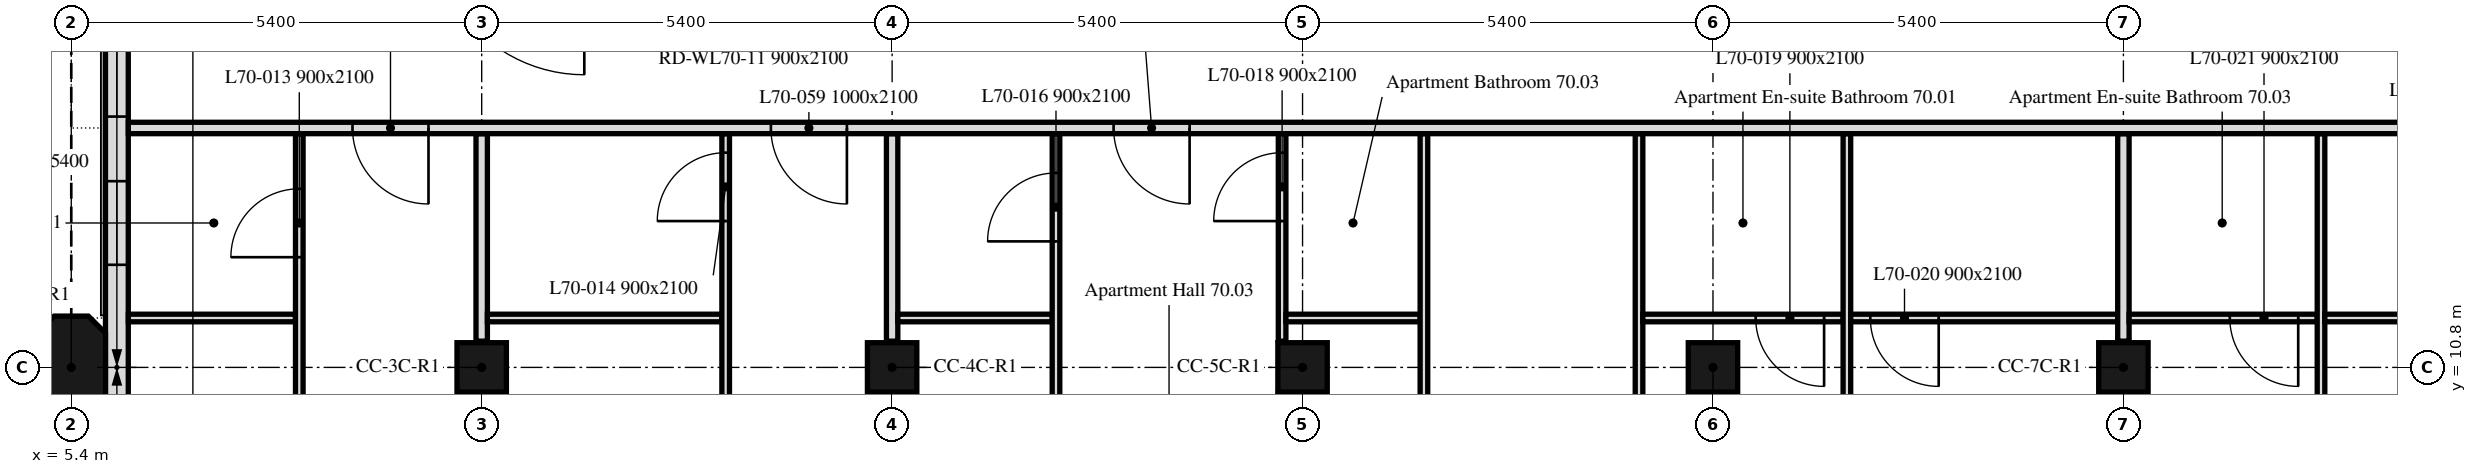
"""IFC4 building model, lengths in metres.
Left out: names, types, materials, properties, quantities, classifications, styles, units other than length and angle.
Written with IfcOpenShell. Run it as: python <this file> out.ifc"""

import sys

from ifc_helpers import new_model, si_unit, direction, frame, frame_2d, origin, origin_2d, place, context, subcontext, project, spatial, polyline, rectangle, outline, extrude, element, fill, save


model = new_model("IFC4")
c1 = context("Model", 3, precision=1e-05, world=origin(), true_north=direction((0.0, 1.0)))
c2 = subcontext(c1, "Body", "Model", "MODEL_VIEW")
j1 = project(units=[si_unit("LENGTHUNIT", "METRE"), si_unit("PLANEANGLEUNIT", "RADIAN")], contexts=[c1])
p1 = place(None, origin())
s1 = spatial("IfcSite", under=j1, at=p1, CompositionType="ELEMENT")
p2 = place(p1, origin())
s2 = spatial("IfcBuilding", under=s1, at=p2, CompositionType="ELEMENT")
p3 = place(p2, frame((0.0, 0.0, 285.1)))
s3 = spatial("IfcBuildingStorey", under=s2, at=p3, CompositionType="ELEMENT", Elevation=285.1)
p4 = place(p3, frame((5.4, 10.8, 0.0), z_axis=(0.0, 0.0, 1.0), x_axis=(0.0, 1.0, 0.0)))
e1 = element("IfcColumn", 1, at=p4, inside=s3, PredefinedType="COLUMN", context=c2, shape_type="SweptSolid", body=[
    extrude(outline(polyline([(-0.45, -0.45), (0.45, -0.45), (0.675, -0.225), (0.675, 0.225), (0.45, 0.45), (-0.45, 0.45), (-0.675, 0.225), (-0.675, -0.225), (-0.45, -0.45)])), origin(), (0.0, 0.0, 1.0), 3.0),
])
for number, where, z_axis, x_axis in (
    (2, (10.8, 10.8, 0.0), (0.0, 0.0, 1.0), (1.0, 0.0, 0.0)),
    (3, (16.2, 10.8, 0.0), (0.0, 0.0, 1.0), (1.0, 0.0, 0.0)),
    (4, (21.6, 10.8, 0.0), (0.0, 0.0, 1.0), (1.0, 0.0, 0.0)),
    (5, (27.0, 10.8, 0.0), (0.0, 0.0, 1.0), (1.0, 0.0, 0.0)),
    (6, (32.4, 10.8, 0.0), (0.0, 0.0, 1.0), (1.0, 0.0, 0.0)),
):
    element("IfcColumn", number, at=place(p3, frame(where, z_axis=z_axis, x_axis=x_axis)), inside=s3, PredefinedType="COLUMN", context=c2, shape_type="SweptSolid", body=[
        extrude(rectangle(XDim=0.65, YDim=0.65, at=origin_2d()), origin(), (0.0, 0.0, 1.0), 3.0),
    ])
p5 = place(p3, frame((6.0, 16.2, 0.0), z_axis=(0.0, 0.0, 1.0), x_axis=(0.0, -1.0, 0.0)))
e7 = element("IfcWall", 7, at=p5, inside=s3, PredefinedType="SOLIDWALL", context=c2, shape_type="SweptSolid", body=[
    extrude(rectangle(XDim=10.614, YDim=0.3, at=frame_2d((5.307, 0.0))), origin(), (0.0, 0.0, 1.0), 3.0),
])
p6 = place(p5, frame((1.0, 0.0, 0.9)))
e8 = element("IfcOpeningElement", 8, at=p6, cuts=e7, PredefinedType="OPENING", context=c2, shape_type="SweptSolid", body=[
    extrude(rectangle(XDim=1.1, YDim=1.7, at=frame_2d((0.55, 0.85))), frame((0.0, 0.16, 0.0), z_axis=(0.0, -1.0, 0.0), x_axis=(1.0, 0.0, 0.0)), (0.0, 0.0, 1.0), 0.32),
])
p7 = place(p5, frame((2.95, 0.0, 0.9)))
e9 = element("IfcOpeningElement", 9, at=p7, cuts=e7, PredefinedType="OPENING", context=c2, shape_type="SweptSolid", body=[
    extrude(rectangle(XDim=1.1, YDim=1.7, at=frame_2d((0.55, 0.85))), frame((0.0, 0.16, 0.0), z_axis=(0.0, -1.0, 0.0), x_axis=(1.0, 0.0, 0.0)), (0.0, 0.0, 1.0), 0.32),
])
p8 = place(p5, frame((6.75, 0.0, 0.9)))
e10 = element("IfcOpeningElement", 10, at=p8, cuts=e7, PredefinedType="OPENING", context=c2, shape_type="SweptSolid", body=[
    extrude(rectangle(XDim=1.1, YDim=1.7, at=frame_2d((0.55, 0.85))), frame((0.0, 0.16, 0.0), z_axis=(0.0, -1.0, 0.0), x_axis=(1.0, 0.0, 0.0)), (0.0, 0.0, 1.0), 0.32),
])
p9 = place(p5, frame((8.35, 0.0, 0.9)))
e11 = element("IfcOpeningElement", 11, at=p9, cuts=e7, PredefinedType="OPENING", context=c2, shape_type="SweptSolid", body=[
    extrude(rectangle(XDim=1.1, YDim=1.7, at=frame_2d((0.55, 0.85))), frame((0.0, 0.16, 0.0), z_axis=(0.0, -1.0, 0.0), x_axis=(1.0, 0.0, 0.0)), (0.0, 0.0, 1.0), 0.32),
])
p10 = place(p3, frame((8.35, 11.45, 0.0), z_axis=(0.0, 0.0, 1.0), x_axis=(-1.0, 0.0, 0.0)))
e12 = element("IfcWall", 12, at=p10, inside=s3, PredefinedType="PARTITIONING", context=c2, shape_type="SweptSolid", body=[
    extrude(rectangle(XDim=2.199, YDim=0.1, at=frame_2d((1.1, 0.0))), origin(), (0.0, 0.0, 1.0), 3.0),
])
p11 = place(p3, frame((8.4, 5.9, 0.0), z_axis=(0.0, 0.0, 1.0), x_axis=(0.0, 1.0, 0.0)))
e13 = element("IfcWall", 13, at=p11, inside=s3, PredefinedType="PARTITIONING", context=c2, shape_type="SweptSolid", body=[
    extrude(rectangle(XDim=7.975, YDim=0.1, at=frame_2d((3.988, 0.0))), origin(), (0.0, 0.0, 1.0), 3.0),
])
p12 = place(p11, frame((6.35, 0.0, 0.0)))
e14 = element("IfcOpeningElement", 14, at=p12, cuts=e13, PredefinedType="OPENING", context=c2, shape_type="SweptSolid", body=[
    extrude(rectangle(XDim=0.9, YDim=2.1, at=frame_2d((0.45, 1.05))), frame((0.0, 0.05, 0.0), z_axis=(0.0, -1.0, 0.0), x_axis=(1.0, 0.0, 0.0)), (0.0, 0.0, 1.0), 0.1),
])
p13 = place(p11, frame((2.3, 0.0, 0.0)))
e15 = element("IfcOpeningElement", 15, at=p13, cuts=e13, PredefinedType="OPENING", context=c2, shape_type="SweptSolid", body=[
    extrude(rectangle(XDim=0.9, YDim=2.1, at=frame_2d((0.45, 1.05))), frame((0.0, 0.05, 0.0), z_axis=(0.0, -1.0, 0.0), x_axis=(1.0, 0.0, 0.0)), (0.0, 0.0, 1.0), 0.1),
])
p14 = place(p3, frame((10.8, 5.9, 0.0), z_axis=(0.0, 0.0, 1.0), x_axis=(0.0, 1.0, 0.0)))
e16 = element("IfcWall", 16, at=p14, inside=s3, PredefinedType="PARTITIONING", context=c2, shape_type="SweptSolid", body=[
    extrude(rectangle(XDim=4.555, YDim=0.15, at=frame_2d((2.278, 0.0))), origin(), (0.0, 0.0, 1.0), 3.0),
])
p15 = place(p3, frame((10.8, 11.145, 0.0), z_axis=(0.0, 0.0, 1.0), x_axis=(0.0, 1.0, 0.0)))
e17 = element("IfcWall", 17, at=p15, inside=s3, PredefinedType="PARTITIONING", context=c2, shape_type="SweptSolid", body=[
    extrude(rectangle(XDim=2.73, YDim=0.15, at=frame_2d((1.365, 0.0))), origin(), (0.0, 0.0, 1.0), 3.0),
])
p16 = place(p3, frame((13.96, 11.45, 0.0), z_axis=(0.0, 0.0, 1.0), x_axis=(-1.0, 0.0, 0.0)))
e18 = element("IfcWall", 18, at=p16, inside=s3, PredefinedType="PARTITIONING", context=c2, shape_type="SweptSolid", body=[
    extrude(rectangle(XDim=3.085, YDim=0.1, at=frame_2d((1.542, 0.0))), origin(), (0.0, 0.0, 1.0), 3.0),
])
p17 = place(p3, frame((14.01, 5.9, 0.0), z_axis=(0.0, 0.0, 1.0), x_axis=(0.0, 1.0, 0.0)))
e19 = element("IfcWall", 19, at=p17, inside=s3, PredefinedType="PARTITIONING", context=c2, shape_type="SweptSolid", body=[
    extrude(rectangle(XDim=7.975, YDim=0.1, at=frame_2d((3.988, 0.0))), origin(), (0.0, 0.0, 1.0), 3.0),
])
p18 = place(p17, frame((6.825, 0.0, 0.0)))
e20 = element("IfcOpeningElement", 20, at=p18, cuts=e19, PredefinedType="OPENING", context=c2, shape_type="SweptSolid", body=[
    extrude(rectangle(XDim=0.9, YDim=2.1, at=frame_2d((0.45, 1.05))), frame((0.0, 0.05, 0.0), z_axis=(0.0, -1.0, 0.0), x_axis=(1.0, 0.0, 0.0)), (0.0, 0.0, 1.0), 0.1),
])
p19 = place(p17, frame((2.3, 0.0, 0.0)))
e21 = element("IfcOpeningElement", 21, at=p19, cuts=e19, PredefinedType="OPENING", context=c2, shape_type="SweptSolid", body=[
    extrude(rectangle(XDim=0.9, YDim=2.1, at=frame_2d((0.45, 1.05))), frame((0.0, 0.05, 0.0), z_axis=(0.0, -1.0, 0.0), x_axis=(1.0, 0.0, 0.0)), (0.0, 0.0, 1.0), 0.1),
])
p20 = place(p3, frame((16.2, 5.9, 0.0), z_axis=(0.0, 0.0, 1.0), x_axis=(0.0, 1.0, 0.0)))
e22 = element("IfcWall", 22, at=p20, inside=s3, PredefinedType="PARTITIONING", context=c2, shape_type="SweptSolid", body=[
    extrude(rectangle(XDim=4.555, YDim=0.15, at=frame_2d((2.278, 0.0))), origin(), (0.0, 0.0, 1.0), 2.4),
])
p21 = place(p3, frame((16.2, 11.145, 0.0), z_axis=(0.0, 0.0, 1.0), x_axis=(0.0, 1.0, 0.0)))
e23 = element("IfcWall", 23, at=p21, inside=s3, PredefinedType="PARTITIONING", context=c2, shape_type="SweptSolid", body=[
    extrude(rectangle(XDim=2.73, YDim=0.15, at=frame_2d((1.365, 0.0))), origin(), (0.0, 0.0, 1.0), 2.4),
])
p22 = place(p3, frame((18.306, 11.45, 0.0), z_axis=(0.0, 0.0, 1.0), x_axis=(-1.0, 0.0, 0.0)))
e24 = element("IfcWall", 24, at=p22, inside=s3, PredefinedType="PARTITIONING", context=c2, shape_type="SweptSolid", body=[
    extrude(rectangle(XDim=2.031, YDim=0.1, at=frame_2d((1.016, 0.0))), origin(), (0.0, 0.0, 1.0), 3.0),
])
p23 = place(p3, frame((18.356, 5.9, 0.0), z_axis=(0.0, 0.0, 1.0), x_axis=(0.0, 1.0, 0.0)))
e25 = element("IfcWall", 25, at=p23, inside=s3, PredefinedType="PARTITIONING", context=c2, shape_type="SweptSolid", body=[
    extrude(rectangle(XDim=7.975, YDim=0.1, at=frame_2d((3.988, 0.0))), origin(), (0.0, 0.0, 1.0), 3.0),
])
p24 = place(p23, frame((6.558, 0.0, 0.0)))
e26 = element("IfcOpeningElement", 26, at=p24, cuts=e25, PredefinedType="OPENING", context=c2, shape_type="SweptSolid", body=[
    extrude(rectangle(XDim=0.9, YDim=2.1, at=frame_2d((0.45, 1.05))), frame((0.0, 0.05, 0.0), z_axis=(0.0, -1.0, 0.0), x_axis=(1.0, 0.0, 0.0)), (0.0, 0.0, 1.0), 0.1),
])
p25 = place(p23, frame((2.3, 0.0, 0.0)))
e27 = element("IfcOpeningElement", 27, at=p25, cuts=e25, PredefinedType="OPENING", context=c2, shape_type="SweptSolid", body=[
    extrude(rectangle(XDim=0.9, YDim=2.1, at=frame_2d((0.45, 1.05))), frame((0.0, 0.05, 0.0), z_axis=(0.0, -1.0, 0.0), x_axis=(1.0, 0.0, 0.0)), (0.0, 0.0, 1.0), 0.1),
])
p26 = place(p3, frame((21.331, 5.9, 0.0), z_axis=(0.0, 0.0, 1.0), x_axis=(0.0, 1.0, 0.0)))
e28 = element("IfcWall", 28, at=p26, inside=s3, PredefinedType="PARTITIONING", context=c2, shape_type="SweptSolid", body=[
    extrude(rectangle(XDim=4.555, YDim=0.1, at=frame_2d((2.278, 0.0))), origin(), (0.0, 0.0, 1.0), 3.0),
])
p27 = place(p26, frame((1.787, 0.0, 0.0)))
e29 = element("IfcOpeningElement", 29, at=p27, cuts=e28, PredefinedType="OPENING", context=c2, shape_type="SweptSolid", body=[
    extrude(rectangle(XDim=0.9, YDim=2.1, at=frame_2d((0.45, 1.05))), frame((0.0, 0.05, 0.0), z_axis=(0.0, -1.0, 0.0), x_axis=(1.0, 0.0, 0.0)), (0.0, 0.0, 1.0), 0.1),
])
p28 = place(p3, frame((21.331, 11.145, 0.0), z_axis=(0.0, 0.0, 1.0), x_axis=(0.0, 1.0, 0.0)))
e30 = element("IfcWall", 30, at=p28, inside=s3, PredefinedType="PARTITIONING", context=c2, shape_type="SweptSolid", body=[
    extrude(rectangle(XDim=2.73, YDim=0.1, at=frame_2d((1.365, 0.0))), origin(), (0.0, 0.0, 1.0), 3.0),
])
p29 = place(p28, frame((1.58, 0.0, 0.0)))
e31 = element("IfcOpeningElement", 31, at=p29, cuts=e30, PredefinedType="OPENING", context=c2, shape_type="SweptSolid", body=[
    extrude(rectangle(XDim=0.9, YDim=2.1, at=frame_2d((0.45, 1.05))), frame((0.0, 0.05, 0.0), z_axis=(0.0, -1.0, 0.0), x_axis=(1.0, 0.0, 0.0)), (0.0, 0.0, 1.0), 0.1),
])
p30 = place(p3, frame((23.147, 11.45, 0.0), z_axis=(0.0, 0.0, 1.0), x_axis=(-1.0, 0.0, 0.0)))
e32 = element("IfcWall", 32, at=p30, inside=s3, PredefinedType="PARTITIONING", context=c2, shape_type="SweptSolid", body=[
    extrude(rectangle(XDim=1.766, YDim=0.1, at=frame_2d((0.883, 0.0))), origin(), (0.0, 0.0, 1.0), 2.4),
])
for number, where, z_axis, x_axis in (
    (33, (23.197, 5.9, 0.0), (0.0, 0.0, 1.0), (0.0, 1.0, 0.0)),
    (34, (26.027, 5.9, 0.0), (0.0, 0.0, 1.0), (0.0, 1.0, 0.0)),
):
    element("IfcWall", number, at=place(p3, frame(where, z_axis=z_axis, x_axis=x_axis)), inside=s3, PredefinedType="PARTITIONING", context=c2, shape_type="SweptSolid", body=[
        extrude(rectangle(XDim=7.975, YDim=0.1, at=frame_2d((3.988, 0.0))), origin(), (0.0, 0.0, 1.0), 3.0),
    ])
p31 = place(p3, frame((28.712, 11.45, 0.0), z_axis=(0.0, 0.0, 1.0), x_axis=(-1.0, 0.0, 0.0)))
e35 = element("IfcWall", 35, at=p31, inside=s3, PredefinedType="PARTITIONING", context=c2, shape_type="SweptSolid", body=[
    extrude(rectangle(XDim=2.635, YDim=0.1, at=frame_2d((1.317, 0.0))), origin(), (0.0, 0.0, 1.0), 2.4),
])
p32 = place(p31, frame((0.25, 0.0, 0.0)))
e36 = element("IfcOpeningElement", 36, at=p32, cuts=e35, PredefinedType="OPENING", context=c2, shape_type="SweptSolid", body=[
    extrude(rectangle(XDim=0.9, YDim=2.1, at=frame_2d((0.45, 1.05))), frame((0.0, 0.05, 0.0), z_axis=(0.0, -1.0, 0.0), x_axis=(1.0, 0.0, 0.0)), (0.0, 0.0, 1.0), 0.1),
])
p33 = place(p3, frame((28.762, 5.9, 0.0), z_axis=(0.0, 0.0, 1.0), x_axis=(0.0, 1.0, 0.0)))
e37 = element("IfcWall", 37, at=p33, inside=s3, PredefinedType="PARTITIONING", context=c2, shape_type="SweptSolid", body=[
    extrude(rectangle(XDim=7.975, YDim=0.1, at=frame_2d((3.988, 0.0))), origin(), (0.0, 0.0, 1.0), 3.0),
])
p34 = place(p3, frame((32.4, 5.9, 0.0), z_axis=(0.0, 0.0, 1.0), x_axis=(0.0, 1.0, 0.0)))
e38 = element("IfcWall", 38, at=p34, inside=s3, PredefinedType="PARTITIONING", context=c2, shape_type="SweptSolid", body=[
    extrude(rectangle(XDim=4.555, YDim=0.15, at=frame_2d((2.278, 0.0))), origin(), (0.0, 0.0, 1.0), 2.4),
])
p35 = place(p3, frame((32.325, 11.45, 0.0), z_axis=(0.0, 0.0, 1.0), x_axis=(-1.0, 0.0, 0.0)))
e39 = element("IfcWall", 39, at=p35, inside=s3, PredefinedType="PARTITIONING", context=c2, shape_type="SweptSolid", body=[
    extrude(rectangle(XDim=3.513, YDim=0.1, at=frame_2d((1.756, 0.0))), origin(), (0.0, 0.0, 1.0), 3.0),
])
p36 = place(p35, frame((2.355, 0.0, 0.0)))
e40 = element("IfcOpeningElement", 40, at=p36, cuts=e39, PredefinedType="OPENING", context=c2, shape_type="SweptSolid", body=[
    extrude(rectangle(XDim=0.9, YDim=2.1, at=frame_2d((0.45, 1.05))), frame((0.0, 0.05, 0.0), z_axis=(0.0, -1.0, 0.0), x_axis=(1.0, 0.0, 0.0)), (0.0, 0.0, 1.0), 0.1),
])
p37 = place(p3, frame((32.4, 11.145, 0.0), z_axis=(0.0, 0.0, 1.0), x_axis=(0.0, 1.0, 0.0)))
e41 = element("IfcWall", 41, at=p37, inside=s3, PredefinedType="PARTITIONING", context=c2, shape_type="SweptSolid", body=[
    extrude(rectangle(XDim=2.73, YDim=0.15, at=frame_2d((1.365, 0.0))), origin(), (0.0, 0.0, 1.0), 2.4),
])
p38 = place(p3, frame((34.95, 11.45, 0.0), z_axis=(0.0, 0.0, 1.0), x_axis=(-1.0, 0.0, 0.0)))
e42 = element("IfcWall", 42, at=p38, inside=s3, PredefinedType="PARTITIONING", context=c2, shape_type="SweptSolid", body=[
    extrude(rectangle(XDim=2.475, YDim=0.1, at=frame_2d((1.237, 0.0))), origin(), (0.0, 0.0, 1.0), 3.0),
])
p39 = place(p38, frame((0.25, 0.0, 0.0)))
e43 = element("IfcOpeningElement", 43, at=p39, cuts=e42, PredefinedType="OPENING", context=c2, shape_type="SweptSolid", body=[
    extrude(rectangle(XDim=0.9, YDim=2.1, at=frame_2d((0.45, 1.05))), frame((0.0, 0.05, 0.0), z_axis=(0.0, -1.0, 0.0), x_axis=(1.0, 0.0, 0.0)), (0.0, 0.0, 1.0), 0.1),
])
p40 = place(p3, frame((35.0, 5.9, 0.0), z_axis=(0.0, 0.0, 1.0), x_axis=(0.0, 1.0, 0.0)))
e44 = element("IfcWall", 44, at=p40, inside=s3, PredefinedType="PARTITIONING", context=c2, shape_type="SweptSolid", body=[
    extrude(rectangle(XDim=7.975, YDim=0.1, at=frame_2d((3.988, 0.0))), origin(), (0.0, 0.0, 1.0), 2.4),
])
p41 = place(p3, frame((37.552, 11.45, 0.0), z_axis=(0.0, 0.0, 1.0), x_axis=(-1.0, 0.0, 0.0)))
e45 = element("IfcWall", 45, at=p41, inside=s3, PredefinedType="PARTITIONING", context=c2, shape_type="SweptSolid", body=[
    extrude(rectangle(XDim=2.502, YDim=0.1, at=frame_2d((1.251, 0.0))), origin(), (0.0, 0.0, 1.0), 3.0),
])
p42 = place(p3, frame((47.849, 13.95, 0.0), z_axis=(0.0, 0.0, 1.0), x_axis=(-1.0, 0.0, 0.0)))
e46 = element("IfcWall", 46, at=p42, inside=s3, PredefinedType="PARTITIONING", context=c2, shape_type="SweptSolid", body=[
    extrude(rectangle(XDim=41.698, YDim=0.15, at=frame_2d((20.849, 0.0))), origin(), (0.0, 0.0, 1.0), 2.4),
])
p43 = place(p42, frame((37.749, 0.0, 0.0)))
e47 = element("IfcOpeningElement", 47, at=p43, cuts=e46, PredefinedType="OPENING", context=c2, shape_type="SweptSolid", body=[
    extrude(rectangle(XDim=1.0, YDim=2.1, at=frame_2d((0.5, 1.05))), frame((0.0, 0.075, 0.0), z_axis=(0.0, -1.0, 0.0), x_axis=(1.0, 0.0, 0.0)), (0.0, 0.0, 1.0), 0.15),
])
p44 = place(p42, frame((32.244, 0.0, 0.0)))
e48 = element("IfcOpeningElement", 48, at=p44, cuts=e46, PredefinedType="OPENING", context=c2, shape_type="SweptSolid", body=[
    extrude(rectangle(XDim=1.0, YDim=2.1, at=frame_2d((0.5, 1.05))), frame((0.0, 0.075, 0.0), z_axis=(0.0, -1.0, 0.0), x_axis=(1.0, 0.0, 0.0)), (0.0, 0.0, 1.0), 0.15),
])
p45 = place(p42, frame((27.735, 0.0, 0.0)))
e49 = element("IfcOpeningElement", 49, at=p45, cuts=e46, PredefinedType="OPENING", context=c2, shape_type="SweptSolid", body=[
    extrude(rectangle(XDim=1.0, YDim=2.1, at=frame_2d((0.5, 1.05))), frame((0.0, 0.075, 0.0), z_axis=(0.0, -1.0, 0.0), x_axis=(1.0, 0.0, 0.0)), (0.0, 0.0, 1.0), 0.15),
])
p46 = place(p42, frame((8.347, 0.0, 0.0)))
e50 = element("IfcOpeningElement", 50, at=p46, cuts=e46, PredefinedType="OPENING", context=c2, shape_type="SweptSolid", body=[
    extrude(rectangle(XDim=1.0, YDim=2.1, at=frame_2d((0.5, 1.05))), frame((0.0, 0.075, 0.0), z_axis=(0.0, -1.0, 0.0), x_axis=(1.0, 0.0, 0.0)), (0.0, 0.0, 1.0), 0.15),
])
p47 = place(p6, origin())
e51 = element("IfcWindow", 51, at=p47, inside=s3, PartitioningType="SINGLE_PANEL", PredefinedType="WINDOW", context=c2, shape_type="SweptSolid", body=[
    extrude(rectangle(XDim=1.1, YDim=1.7, at=frame_2d((0.55, 0.85))), frame((0.0, 0.03, 0.0), z_axis=(0.0, -1.0, 0.0), x_axis=(1.0, 0.0, 0.0)), (0.0, 0.0, 1.0), 0.06),
])
fill(e8, e51)
p48 = place(p7, origin())
e52 = element("IfcWindow", 52, at=p48, inside=s3, PartitioningType="SINGLE_PANEL", PredefinedType="WINDOW", context=c2, shape_type="SweptSolid", body=[
    extrude(rectangle(XDim=1.1, YDim=1.7, at=frame_2d((0.55, 0.85))), frame((0.0, 0.03, 0.0), z_axis=(0.0, -1.0, 0.0), x_axis=(1.0, 0.0, 0.0)), (0.0, 0.0, 1.0), 0.06),
])
fill(e9, e52)
p49 = place(p12, origin())
e53 = element("IfcDoor", 53, at=p49, inside=s3, OperationType="SINGLE_SWING_LEFT", PredefinedType="DOOR", context=c2, shape_type="SweptSolid", body=[
    extrude(rectangle(XDim=0.9, YDim=2.1, at=frame_2d((0.45, 1.05))), frame((0.0, 0.025, 0.0), z_axis=(0.0, -1.0, 0.0), x_axis=(1.0, 0.0, 0.0)), (0.0, 0.0, 1.0), 0.05),
])
fill(e14, e53)
p50 = place(p18, origin())
e54 = element("IfcDoor", 54, at=p50, inside=s3, OperationType="SINGLE_SWING_RIGHT", PredefinedType="DOOR", context=c2, shape_type="SweptSolid", body=[
    extrude(rectangle(XDim=0.9, YDim=2.1, at=frame_2d((0.45, 1.05))), frame((0.0, 0.025, 0.0), z_axis=(0.0, -1.0, 0.0), x_axis=(1.0, 0.0, 0.0)), (0.0, 0.0, 1.0), 0.05),
])
fill(e20, e54)
p51 = place(p24, origin())
e55 = element("IfcDoor", 55, at=p51, inside=s3, OperationType="SINGLE_SWING_LEFT", PredefinedType="DOOR", context=c2, shape_type="SweptSolid", body=[
    extrude(rectangle(XDim=0.9, YDim=2.1, at=frame_2d((0.45, 1.05))), frame((0.0, 0.025, 0.0), z_axis=(0.0, -1.0, 0.0), x_axis=(1.0, 0.0, 0.0)), (0.0, 0.0, 1.0), 0.05),
])
fill(e26, e55)
p52 = place(p29, origin())
e56 = element("IfcDoor", 56, at=p52, inside=s3, OperationType="SINGLE_SWING_RIGHT", PredefinedType="DOOR", context=c2, shape_type="SweptSolid", body=[
    extrude(rectangle(XDim=0.9, YDim=2.1, at=frame_2d((0.45, 1.05))), frame((0.0, 0.025, 0.0), z_axis=(0.0, -1.0, 0.0), x_axis=(1.0, 0.0, 0.0)), (0.0, 0.0, 1.0), 0.05),
])
fill(e31, e56)
p53 = place(p32, origin())
e57 = element("IfcDoor", 57, at=p53, inside=s3, OperationType="SINGLE_SWING_LEFT", PredefinedType="DOOR", context=c2, shape_type="SweptSolid", body=[
    extrude(rectangle(XDim=0.9, YDim=2.1, at=frame_2d((0.45, 1.05))), frame((0.0, 0.025, 0.0), z_axis=(0.0, -1.0, 0.0), x_axis=(1.0, 0.0, 0.0)), (0.0, 0.0, 1.0), 0.05),
])
fill(e36, e57)
p54 = place(p36, origin())
e58 = element("IfcDoor", 58, at=p54, inside=s3, OperationType="SINGLE_SWING_LEFT", PredefinedType="DOOR", context=c2, shape_type="SweptSolid", body=[
    extrude(rectangle(XDim=0.9, YDim=2.1, at=frame_2d((0.45, 1.05))), frame((0.0, 0.025, 0.0), z_axis=(0.0, -1.0, 0.0), x_axis=(1.0, 0.0, 0.0)), (0.0, 0.0, 1.0), 0.05),
])
fill(e40, e58)
p55 = place(p39, origin())
e59 = element("IfcDoor", 59, at=p55, inside=s3, OperationType="SINGLE_SWING_RIGHT", PredefinedType="DOOR", context=c2, shape_type="SweptSolid", body=[
    extrude(rectangle(XDim=0.9, YDim=2.1, at=frame_2d((0.45, 1.05))), frame((0.0, 0.025, 0.0), z_axis=(0.0, -1.0, 0.0), x_axis=(1.0, 0.0, 0.0)), (0.0, 0.0, 1.0), 0.05),
])
fill(e43, e59)
p56 = place(p43, origin())
e60 = element("IfcDoor", 60, at=p56, inside=s3, OperationType="SINGLE_SWING_LEFT", PredefinedType="DOOR", context=c2, shape_type="SweptSolid", body=[
    extrude(rectangle(XDim=1.0, YDim=2.1, at=frame_2d((0.5, 1.05))), frame((0.0, 0.025, 0.0), z_axis=(0.0, -1.0, 0.0), x_axis=(1.0, 0.0, 0.0)), (0.0, 0.0, 1.0), 0.05),
])
fill(e47, e60)
p57 = place(p44, origin())
e61 = element("IfcDoor", 61, at=p57, inside=s3, OperationType="SINGLE_SWING_LEFT", PredefinedType="DOOR", context=c2, shape_type="SweptSolid", body=[
    extrude(rectangle(XDim=1.0, YDim=2.1, at=frame_2d((0.5, 1.05))), frame((0.0, 0.025, 0.0), z_axis=(0.0, -1.0, 0.0), x_axis=(1.0, 0.0, 0.0)), (0.0, 0.0, 1.0), 0.05),
])
fill(e48, e61)
p58 = place(p45, origin())
e62 = element("IfcDoor", 62, at=p58, inside=s3, OperationType="SINGLE_SWING_RIGHT", PredefinedType="DOOR", context=c2, shape_type="SweptSolid", body=[
    extrude(rectangle(XDim=1.0, YDim=2.1, at=frame_2d((0.5, 1.05))), frame((0.0, 0.025, 0.0), z_axis=(0.0, -1.0, 0.0), x_axis=(1.0, 0.0, 0.0)), (0.0, 0.0, 1.0), 0.05),
])
fill(e49, e62)
save(model, sys.argv[1])
